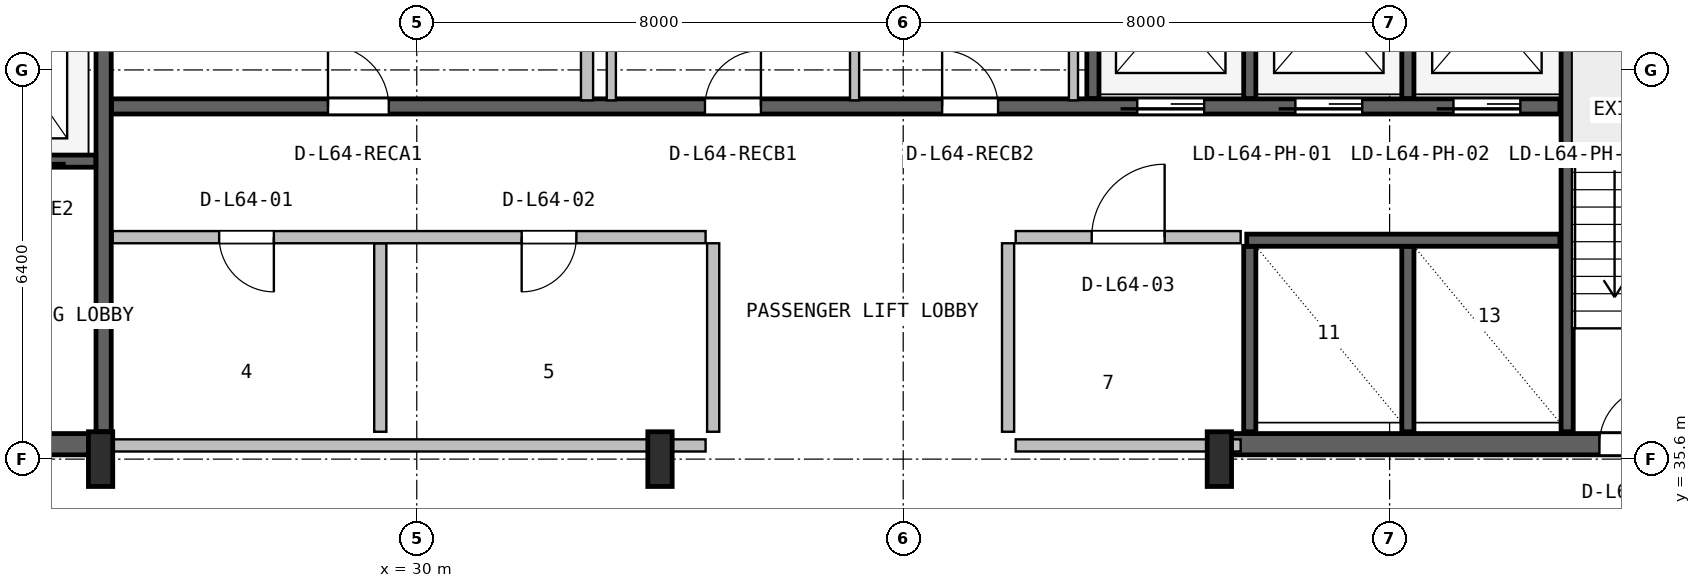
"""IFC4 building model, lengths in metres.
Left out: names, types, materials, properties, quantities, classifications, styles, units other than length and angle.
Written with IfcOpenShell. Run it as: python <this file> out.ifc"""

import sys

from ifc_helpers import new_model, si_unit, direction, frame, frame_2d, origin, origin_2d, place, context, subcontext, project, spatial, rectangle, i_section, extrude, source, transform, mapped, element, fill, save


model = new_model("IFC4")
c1 = context("Model", 3, precision=1e-05, world=origin(), true_north=direction((0.0, 1.0)))
c2 = subcontext(c1, "Body", "Model", "MODEL_VIEW")
j1 = project(units=[si_unit("LENGTHUNIT", "METRE"), si_unit("PLANEANGLEUNIT", "RADIAN")], contexts=[c1])
p1 = place(None, origin())
s1 = spatial("IfcSite", under=j1, at=p1, CompositionType="ELEMENT")
p2 = place(p1, origin())
s2 = spatial("IfcBuilding", under=s1, at=p2, CompositionType="ELEMENT")
p3 = place(p2, frame((0.0, 0.0, 258.4)))
s3 = spatial("IfcBuildingStorey", under=s2, at=p3, CompositionType="ELEMENT", Elevation=258.4)
p4 = place(p3, frame((15.67, 35.845, 0.0), z_axis=(0.0, 0.0, 1.0), x_axis=(1.0, 0.0, 0.0)))
e1 = element("IfcWall", 1, at=p4, inside=s3, PredefinedType="SHEAR", context=c2, shape_type="SweptSolid", body=[
    extrude(rectangle(XDim=9.13, YDim=0.35, at=frame_2d((4.565, 0.0))), origin(), (0.0, 0.0, 1.0), 3.55),
])
p5 = place(p4, frame((5.4, 0.0, 0.0)))
e2 = element("IfcOpeningElement", 2, at=p5, cuts=e1, PredefinedType="OPENING", context=c2, shape_type="SweptSolid", body=[
    extrude(rectangle(XDim=1.0, YDim=2.1, at=frame_2d((0.5, 1.05))), frame((0.0, 0.185, 0.0), z_axis=(0.0, -1.0, 0.0), x_axis=(1.0, 0.0, 0.0)), (0.0, 0.0, 1.0), 0.37),
])
p6 = place(p3, frame((43.2, 35.845, 0.0), z_axis=(0.0, 0.0, 1.0), x_axis=(1.0, 0.0, 0.0)))
e3 = element("IfcWall", 3, at=p6, inside=s3, PredefinedType="SHEAR", context=c2, shape_type="SweptSolid", body=[
    extrude(rectangle(XDim=9.13, YDim=0.35, at=frame_2d((4.565, 0.0))), origin(), (0.0, 0.0, 1.0), 3.55),
])
p7 = place(p6, frame((6.25, 0.0, 0.0)))
e4 = element("IfcOpeningElement", 4, at=p7, cuts=e3, PredefinedType="OPENING", context=c2, shape_type="SweptSolid", body=[
    extrude(rectangle(XDim=0.95, YDim=2.1, at=frame_2d((0.475, 1.05))), frame((0.0, 0.185, 0.0), z_axis=(0.0, -1.0, 0.0), x_axis=(1.0, 0.0, 0.0)), (0.0, 0.0, 1.0), 0.37),
])
m1 = source(origin(), c2, "Body", "SweptSolid", [
    extrude(i_section(OverallWidth=0.4, OverallDepth=0.9, WebThickness=0.016, FlangeThickness=0.028, FilletRadius=0.016, at=origin_2d()), origin(), (0.0, 0.0, 1.0), 3.8),
])
for number, where, z_axis, x_axis in (
    (5, (24.8, 35.6, 0.0), (0.0, 0.0, 1.0), (1.0, 0.0, 0.0)),
    (6, (34.0, 35.6, 0.0), (0.0, 0.0, 1.0), (1.0, 0.0, 0.0)),
    (7, (43.2, 35.6, 0.0), (0.0, 0.0, 1.0), (1.0, 0.0, 0.0)),
):
    element("IfcColumn", number, at=place(p3, frame(where, z_axis=z_axis, x_axis=x_axis)), inside=s3, PredefinedType="COLUMN", context=c2, shape_type="MappedRepresentation", body=[
        mapped(m1, transform((0.0, 0.0, 0.0), x_axis=(1.0, 0.0, 0.0), y_axis=(0.0, 1.0, 0.0), z_axis=(0.0, 0.0, 1.0), scale=1.0)),
    ])
p8 = place(p3, frame((24.85, 36.05, 0.0), z_axis=(0.0, 0.0, 1.0), x_axis=(0.0, 1.0, 0.0)))
e8 = element("IfcWall", 8, at=p8, inside=s3, PredefinedType="SHEAR", context=c2, shape_type="SweptSolid", body=[
    extrude(rectangle(XDim=10.45, YDim=0.25, at=frame_2d((5.225, 0.0))), origin(), (0.0, 0.0, 1.0), 3.55),
])
p9 = place(p3, frame((19.2, 40.5, 0.0), z_axis=(0.0, 0.0, 1.0), x_axis=(1.0, 0.0, 0.0)))
e9 = element("IfcWall", 9, at=p9, inside=s3, PredefinedType="SHEAR", context=c2, shape_type="SweptSolid", body=[
    extrude(rectangle(XDim=5.52, YDim=0.2, at=frame_2d((2.76, 0.0))), origin(), (0.0, 0.0, 1.0), 3.55),
])
p10 = place(p9, frame((1.05, 0.0, 0.0)))
e10 = element("IfcOpeningElement", 10, at=p10, cuts=e9, PredefinedType="OPENING", context=c2, shape_type="SweptSolid", body=[
    extrude(rectangle(XDim=1.1, YDim=2.18, at=frame_2d((0.55, 1.09))), frame((0.0, 0.11, 0.0), z_axis=(0.0, -1.0, 0.0), x_axis=(1.0, 0.0, 0.0)), (0.0, 0.0, 1.0), 0.22),
])
p11 = place(p9, frame((3.65, 0.0, 0.0)))
e11 = element("IfcOpeningElement", 11, at=p11, cuts=e9, PredefinedType="OPENING", context=c2, shape_type="SweptSolid", body=[
    extrude(rectangle(XDim=1.1, YDim=2.18, at=frame_2d((0.55, 1.09))), frame((0.0, 0.11, 0.0), z_axis=(0.0, -1.0, 0.0), x_axis=(1.0, 0.0, 0.0)), (0.0, 0.0, 1.0), 0.22),
])
p12 = place(p3, frame((48.92, 36.05, 0.0), z_axis=(0.0, 0.0, 1.0), x_axis=(0.0, 1.0, 0.0)))
e12 = element("IfcWall", 12, at=p12, inside=s3, PredefinedType="SHEAR", context=c2, shape_type="SweptSolid", body=[
    extrude(rectangle(XDim=10.5, YDim=0.2, at=frame_2d((5.25, 0.0))), origin(), (0.0, 0.0, 1.0), 3.55),
])
p13 = place(p3, frame((24.98, 41.4, 0.0), z_axis=(0.0, 0.0, 1.0), x_axis=(1.0, 0.0, 0.0)))
e13 = element("IfcWall", 13, at=p13, inside=s3, PredefinedType="SHEAR", context=c2, shape_type="SweptSolid", body=[
    extrude(rectangle(XDim=23.82, YDim=0.25, at=frame_2d((11.91, 0.0))), origin(), (0.0, 0.0, 1.0), 3.55),
])
p14 = place(p13, frame((16.87, 0.0, 0.0)))
e14 = element("IfcOpeningElement", 14, at=p14, cuts=e13, PredefinedType="OPENING", context=c2, shape_type="SweptSolid", body=[
    extrude(rectangle(XDim=1.1, YDim=2.18, at=frame_2d((0.55, 1.09))), frame((0.0, 0.135, 0.0), z_axis=(0.0, -1.0, 0.0), x_axis=(1.0, 0.0, 0.0)), (0.0, 0.0, 1.0), 0.27),
])
p15 = place(p13, frame((19.47, 0.0, 0.0)))
e15 = element("IfcOpeningElement", 15, at=p15, cuts=e13, PredefinedType="OPENING", context=c2, shape_type="SweptSolid", body=[
    extrude(rectangle(XDim=1.1, YDim=2.18, at=frame_2d((0.55, 1.09))), frame((0.0, 0.135, 0.0), z_axis=(0.0, -1.0, 0.0), x_axis=(1.0, 0.0, 0.0)), (0.0, 0.0, 1.0), 0.27),
])
p16 = place(p13, frame((22.07, 0.0, 0.0)))
e16 = element("IfcOpeningElement", 16, at=p16, cuts=e13, PredefinedType="OPENING", context=c2, shape_type="SweptSolid", body=[
    extrude(rectangle(XDim=1.1, YDim=2.18, at=frame_2d((0.55, 1.09))), frame((0.0, 0.135, 0.0), z_axis=(0.0, -1.0, 0.0), x_axis=(1.0, 0.0, 0.0)), (0.0, 0.0, 1.0), 0.27),
])
p17 = place(p13, frame((3.56, 0.0, 0.0)))
e17 = element("IfcOpeningElement", 17, at=p17, cuts=e13, PredefinedType="OPENING", context=c2, shape_type="SweptSolid", body=[
    extrude(rectangle(XDim=1.0, YDim=2.08, at=frame_2d((0.5, 1.04))), frame((0.0, 0.135, 0.0), z_axis=(0.0, -1.0, 0.0), x_axis=(1.0, 0.0, 0.0)), (0.0, 0.0, 1.0), 0.27),
])
p18 = place(p13, frame((9.76, 0.0, 0.0)))
e18 = element("IfcOpeningElement", 18, at=p18, cuts=e13, PredefinedType="OPENING", context=c2, shape_type="SweptSolid", body=[
    extrude(rectangle(XDim=0.92, YDim=2.08, at=frame_2d((0.46, 1.04))), frame((0.0, 0.135, 0.0), z_axis=(0.0, -1.0, 0.0), x_axis=(1.0, 0.0, 0.0)), (0.0, 0.0, 1.0), 0.27),
])
p19 = place(p13, frame((13.66, 0.0, 0.0)))
e19 = element("IfcOpeningElement", 19, at=p19, cuts=e13, PredefinedType="OPENING", context=c2, shape_type="SweptSolid", body=[
    extrude(rectangle(XDim=0.92, YDim=2.08, at=frame_2d((0.46, 1.04))), frame((0.0, 0.135, 0.0), z_axis=(0.0, -1.0, 0.0), x_axis=(1.0, 0.0, 0.0)), (0.0, 0.0, 1.0), 0.27),
])
p20 = place(p3, frame((41.12, 41.53, 0.0), z_axis=(0.0, 0.0, 1.0), x_axis=(0.0, 1.0, 0.0)))
e20 = element("IfcWall", 20, at=p20, inside=s3, PredefinedType="SHEAR", context=c2, shape_type="SweptSolid", body=[
    extrude(rectangle(XDim=5.02, YDim=0.2, at=frame_2d((2.51, 0.0))), origin(), (0.0, 0.0, 1.0), 3.55),
])
for number, where, z_axis, x_axis in (
    (21, (43.7, 41.53, 0.0), (0.0, 0.0, 1.0), (0.0, 1.0, 0.0)),
    (22, (46.3, 41.53, 0.0), (0.0, 0.0, 1.0), (0.0, 1.0, 0.0)),
):
    element("IfcWall", number, at=place(p3, frame(where, z_axis=z_axis, x_axis=x_axis)), inside=s3, PredefinedType="SHEAR", context=c2, shape_type="SweptSolid", body=[
        extrude(rectangle(XDim=2.87, YDim=0.2, at=frame_2d((1.435, 0.0))), origin(), (0.0, 0.0, 1.0), 3.55),
    ])
for number, where, z_axis, x_axis in (
    (23, (43.7, 36.05, 0.0), (0.0, 0.0, 1.0), (0.0, 1.0, 0.0)),
    (24, (46.3, 36.05, 0.0), (0.0, 0.0, 1.0), (0.0, 1.0, 0.0)),
):
    element("IfcWall", number, at=place(p3, frame(where, z_axis=z_axis, x_axis=x_axis)), inside=s3, PredefinedType="SHEAR", context=c2, shape_type="SweptSolid", body=[
        extrude(rectangle(XDim=3.05, YDim=0.2, at=frame_2d((1.525, 0.0))), origin(), (0.0, 0.0, 1.0), 3.55),
    ])
p21 = place(p3, frame((43.65, 39.2, 0.0), z_axis=(0.0, 0.0, 1.0), x_axis=(1.0, 0.0, 0.0)))
e25 = element("IfcWall", 25, at=p21, inside=s3, PredefinedType="SHEAR", context=c2, shape_type="SweptSolid", body=[
    extrude(rectangle(XDim=5.15, YDim=0.2, at=frame_2d((2.575, 0.0))), origin(), (0.0, 0.0, 1.0), 3.55),
])
p22 = place(p3, frame((25.0, 35.825, 0.0), z_axis=(0.0, 0.0, 1.0), x_axis=(1.0, 0.0, 0.0)))
e26 = element("IfcWall", 26, at=p22, inside=s3, PredefinedType="PLUMBINGWALL", context=c2, shape_type="SweptSolid", body=[
    extrude(rectangle(XDim=9.75, YDim=0.2, at=frame_2d((4.875, 0.0))), origin(), (0.0, 0.0, 1.0), 2.575),
])
p23 = place(p3, frame((29.4, 36.05, 0.0), z_axis=(0.0, 0.0, 1.0), x_axis=(0.0, 1.0, 0.0)))
e27 = element("IfcWall", 27, at=p23, inside=s3, PredefinedType="PLUMBINGWALL", context=c2, shape_type="SweptSolid", body=[
    extrude(rectangle(XDim=3.1, YDim=0.2, at=frame_2d((1.55, 0.0))), origin(), (0.0, 0.0, 1.0), 3.53),
])
p24 = place(p3, frame((25.0, 39.25, 0.0), z_axis=(0.0, 0.0, 1.0), x_axis=(1.0, 0.0, 0.0)))
e28 = element("IfcWall", 28, at=p24, inside=s3, PredefinedType="PLUMBINGWALL", context=c2, shape_type="SweptSolid", body=[
    extrude(rectangle(XDim=9.75, YDim=0.2, at=frame_2d((4.875, 0.0))), origin(), (0.0, 0.0, 1.0), 3.53),
])
p25 = place(p24, frame((1.75, 0.0, 0.0)))
e29 = element("IfcOpeningElement", 29, at=p25, cuts=e28, PredefinedType="OPENING", context=c2, shape_type="SweptSolid", body=[
    extrude(rectangle(XDim=0.9, YDim=2.06, at=frame_2d((0.45, 1.03))), frame((0.0, 0.11, 0.0), z_axis=(0.0, -1.0, 0.0), x_axis=(1.0, 0.0, 0.0)), (0.0, 0.0, 1.0), 0.22),
])
p26 = place(p24, frame((6.725, 0.0, 0.0)))
e30 = element("IfcOpeningElement", 30, at=p26, cuts=e28, PredefinedType="OPENING", context=c2, shape_type="SweptSolid", body=[
    extrude(rectangle(XDim=0.9, YDim=2.06, at=frame_2d((0.45, 1.03))), frame((0.0, 0.11, 0.0), z_axis=(0.0, -1.0, 0.0), x_axis=(1.0, 0.0, 0.0)), (0.0, 0.0, 1.0), 0.22),
])
p27 = place(p3, frame((34.875, 36.05, 0.0), z_axis=(0.0, 0.0, 1.0), x_axis=(0.0, 1.0, 0.0)))
e31 = element("IfcWall", 31, at=p27, inside=s3, PredefinedType="PLUMBINGWALL", context=c2, shape_type="SweptSolid", body=[
    extrude(rectangle(XDim=3.1, YDim=0.2, at=frame_2d((1.55, 0.0))), origin(), (0.0, 0.0, 1.0), 3.53),
])
p28 = place(p3, frame((39.85, 35.825, 0.0), z_axis=(0.0, 0.0, 1.0), x_axis=(1.0, 0.0, 0.0)))
e32 = element("IfcWall", 32, at=p28, inside=s3, PredefinedType="SOLIDWALL", context=c2, shape_type="SweptSolid", body=[
    extrude(rectangle(XDim=3.7, YDim=0.2, at=frame_2d((1.85, 0.0))), origin(), (0.0, 0.0, 1.0), 2.575),
])
p29 = place(p3, frame((39.85, 39.25, 0.0), z_axis=(0.0, 0.0, 1.0), x_axis=(1.0, 0.0, 0.0)))
e33 = element("IfcWall", 33, at=p29, inside=s3, PredefinedType="SOLIDWALL", context=c2, shape_type="SweptSolid", body=[
    extrude(rectangle(XDim=3.7, YDim=0.2, at=frame_2d((1.85, 0.0))), origin(), (0.0, 0.0, 1.0), 3.53),
])
p30 = place(p29, frame((1.25, 0.0, 0.0)))
e34 = element("IfcOpeningElement", 34, at=p30, cuts=e33, PredefinedType="OPENING", context=c2, shape_type="SweptSolid", body=[
    extrude(rectangle(XDim=1.2, YDim=2.1, at=frame_2d((0.6, 1.05))), frame((0.0, 0.11, 0.0), z_axis=(0.0, -1.0, 0.0), x_axis=(1.0, 0.0, 0.0)), (0.0, 0.0, 1.0), 0.22),
])
p31 = place(p3, frame((39.725, 36.05, 0.0), z_axis=(0.0, 0.0, 1.0), x_axis=(0.0, 1.0, 0.0)))
e35 = element("IfcWall", 35, at=p31, inside=s3, PredefinedType="SOLIDWALL", context=c2, shape_type="SweptSolid", body=[
    extrude(rectangle(XDim=3.1, YDim=0.2, at=frame_2d((1.55, 0.0))), origin(), (0.0, 0.0, 1.0), 3.53),
])
p32 = place(p3, frame((32.8, 41.5, 0.0), z_axis=(0.0, 0.0, 1.0), x_axis=(0.0, 1.0, 0.0)))
e36 = element("IfcWall", 36, at=p32, inside=s3, PredefinedType="SOLIDWALL", context=c2, shape_type="SweptSolid", body=[
    extrude(rectangle(XDim=5.02, YDim=0.2, at=frame_2d((2.51, 0.0))), origin(), (0.0, 0.0, 1.0), 3.53),
])
p33 = place(p3, frame((37.2, 41.5, 0.0), z_axis=(0.0, 0.0, 1.0), x_axis=(0.0, 1.0, 0.0)))
e37 = element("IfcWall", 37, at=p33, inside=s3, PredefinedType="PARTITIONING", context=c2, shape_type="SweptSolid", body=[
    extrude(rectangle(XDim=2.325, YDim=0.15, at=frame_2d((1.163, 0.0))), origin(), (0.0, 0.0, 1.0), 3.53),
])
for number, where, z_axis, x_axis in (
    (38, (40.8, 41.5, 0.0), (0.0, 0.0, 1.0), (0.0, 1.0, 0.0)),
    (39, (33.2, 41.5, 0.0), (0.0, 0.0, 1.0), (0.0, 1.0, 0.0)),
):
    element("IfcWall", number, at=place(p3, frame(where, z_axis=z_axis, x_axis=x_axis)), inside=s3, PredefinedType="PARTITIONING", context=c2, shape_type="SweptSolid", body=[
        extrude(rectangle(XDim=5.02, YDim=0.15, at=frame_2d((2.51, 0.0))), origin(), (0.0, 0.0, 1.0), 3.53),
    ])
m2 = source(origin(), c2, "Body", "SweptSolid", [
    extrude(rectangle(XDim=0.95, YDim=2.1, at=frame_2d((0.475, 1.05))), frame((0.0, 0.025, 0.0), z_axis=(0.0, -1.0, 0.0), x_axis=(1.0, 0.0, 0.0)), (0.0, 0.0, 1.0), 0.05),
])
p34 = place(p7, origin())
e40 = element("IfcDoor", 40, at=p34, inside=s3, OperationType="SINGLE_SWING_RIGHT", PredefinedType="DOOR", context=c2, shape_type="MappedRepresentation", body=[
    mapped(m2, transform((0.0, 0.0, 0.0), x_axis=(1.0, 0.0, 0.0), y_axis=(0.0, 1.0, 0.0), z_axis=(0.0, 0.0, 1.0), scale=1.0)),
])
fill(e4, e40)
m3 = source(origin(), c2, "Body", "SweptSolid", [
    extrude(rectangle(XDim=1.1, YDim=2.18, at=frame_2d((0.55, 1.09))), frame((0.0, 0.025, 0.0), z_axis=(0.0, -1.0, 0.0), x_axis=(1.0, 0.0, 0.0)), (0.0, 0.0, 1.0), 0.05),
])
p35 = place(p14, frame((1.1, 0.0, 0.0), z_axis=(0.0, 0.0, 1.0), x_axis=(-1.0, 0.0, 0.0)))
e41 = element("IfcDoor", 41, at=p35, inside=s3, OperationType="SLIDING_TO_LEFT", PredefinedType="DOOR", context=c2, shape_type="MappedRepresentation", body=[
    mapped(m3, transform((0.0, 0.0, 0.0), x_axis=(1.0, 0.0, 0.0), y_axis=(0.0, 1.0, 0.0), z_axis=(0.0, 0.0, 1.0), scale=1.0)),
])
fill(e14, e41)
p36 = place(p15, frame((1.1, 0.0, 0.0), z_axis=(0.0, 0.0, 1.0), x_axis=(-1.0, 0.0, 0.0)))
e42 = element("IfcDoor", 42, at=p36, inside=s3, OperationType="SLIDING_TO_LEFT", PredefinedType="DOOR", context=c2, shape_type="MappedRepresentation", body=[
    mapped(m3, transform((0.0, 0.0, 0.0), x_axis=(1.0, 0.0, 0.0), y_axis=(0.0, 1.0, 0.0), z_axis=(0.0, 0.0, 1.0), scale=1.0)),
])
fill(e15, e42)
p37 = place(p16, frame((1.1, 0.0, 0.0), z_axis=(0.0, 0.0, 1.0), x_axis=(-1.0, 0.0, 0.0)))
e43 = element("IfcDoor", 43, at=p37, inside=s3, OperationType="SLIDING_TO_LEFT", PredefinedType="DOOR", context=c2, shape_type="MappedRepresentation", body=[
    mapped(m3, transform((0.0, 0.0, 0.0), x_axis=(1.0, 0.0, 0.0), y_axis=(0.0, 1.0, 0.0), z_axis=(0.0, 0.0, 1.0), scale=1.0)),
])
fill(e16, e43)
m4 = source(origin(), c2, "Body", "SweptSolid", [
    extrude(rectangle(XDim=1.0, YDim=2.08, at=frame_2d((0.5, 1.04))), frame((0.0, 0.025, 0.0), z_axis=(0.0, -1.0, 0.0), x_axis=(1.0, 0.0, 0.0)), (0.0, 0.0, 1.0), 0.05),
])
p38 = place(p17, origin())
e44 = element("IfcDoor", 44, at=p38, inside=s3, OperationType="SINGLE_SWING_LEFT", PredefinedType="DOOR", context=c2, shape_type="MappedRepresentation", body=[
    mapped(m4, transform((0.0, 0.0, 0.0), x_axis=(1.0, 0.0, 0.0), y_axis=(0.0, 1.0, 0.0), z_axis=(0.0, 0.0, 1.0), scale=1.0)),
])
fill(e17, e44)
m5 = source(origin(), c2, "Body", "SweptSolid", [
    extrude(rectangle(XDim=0.92, YDim=2.08, at=frame_2d((0.46, 1.04))), frame((0.0, 0.025, 0.0), z_axis=(0.0, -1.0, 0.0), x_axis=(1.0, 0.0, 0.0)), (0.0, 0.0, 1.0), 0.05),
])
p39 = place(p18, origin())
e45 = element("IfcDoor", 45, at=p39, inside=s3, OperationType="SINGLE_SWING_RIGHT", PredefinedType="DOOR", context=c2, shape_type="MappedRepresentation", body=[
    mapped(m5, transform((0.0, 0.0, 0.0), x_axis=(1.0, 0.0, 0.0), y_axis=(0.0, 1.0, 0.0), z_axis=(0.0, 0.0, 1.0), scale=1.0)),
])
fill(e18, e45)
p40 = place(p19, origin())
e46 = element("IfcDoor", 46, at=p40, inside=s3, OperationType="SINGLE_SWING_LEFT", PredefinedType="DOOR", context=c2, shape_type="MappedRepresentation", body=[
    mapped(m5, transform((0.0, 0.0, 0.0), x_axis=(1.0, 0.0, 0.0), y_axis=(0.0, 1.0, 0.0), z_axis=(0.0, 0.0, 1.0), scale=1.0)),
])
fill(e19, e46)
m6 = source(origin(), c2, "Body", "SweptSolid", [
    extrude(rectangle(XDim=0.9, YDim=2.06, at=frame_2d((0.45, 1.03))), frame((0.0, 0.025, 0.0), z_axis=(0.0, -1.0, 0.0), x_axis=(1.0, 0.0, 0.0)), (0.0, 0.0, 1.0), 0.05),
])
p41 = place(p25, frame((0.9, 0.0, 0.0), z_axis=(0.0, 0.0, 1.0), x_axis=(-1.0, 0.0, 0.0)))
e47 = element("IfcDoor", 47, at=p41, inside=s3, OperationType="SINGLE_SWING_RIGHT", PredefinedType="DOOR", context=c2, shape_type="MappedRepresentation", body=[
    mapped(m6, transform((0.0, 0.0, 0.0), x_axis=(1.0, 0.0, 0.0), y_axis=(0.0, 1.0, 0.0), z_axis=(0.0, 0.0, 1.0), scale=1.0)),
])
fill(e29, e47)
p42 = place(p26, frame((0.9, 0.0, 0.0), z_axis=(0.0, 0.0, 1.0), x_axis=(-1.0, 0.0, 0.0)))
e48 = element("IfcDoor", 48, at=p42, inside=s3, OperationType="SINGLE_SWING_LEFT", PredefinedType="DOOR", context=c2, shape_type="MappedRepresentation", body=[
    mapped(m6, transform((0.0, 0.0, 0.0), x_axis=(1.0, 0.0, 0.0), y_axis=(0.0, 1.0, 0.0), z_axis=(0.0, 0.0, 1.0), scale=1.0)),
])
fill(e30, e48)
m7 = source(origin(), c2, "Body", "SweptSolid", [
    extrude(rectangle(XDim=1.2, YDim=2.1, at=frame_2d((0.6, 1.05))), frame((0.0, 0.025, 0.0), z_axis=(0.0, -1.0, 0.0), x_axis=(1.0, 0.0, 0.0)), (0.0, 0.0, 1.0), 0.05),
])
p43 = place(p30, origin())
e49 = element("IfcDoor", 49, at=p43, inside=s3, OperationType="SINGLE_SWING_RIGHT", PredefinedType="DOOR", context=c2, shape_type="MappedRepresentation", body=[
    mapped(m7, transform((0.0, 0.0, 0.0), x_axis=(1.0, 0.0, 0.0), y_axis=(0.0, 1.0, 0.0), z_axis=(0.0, 0.0, 1.0), scale=1.0)),
])
fill(e34, e49)
save(model, sys.argv[1])
